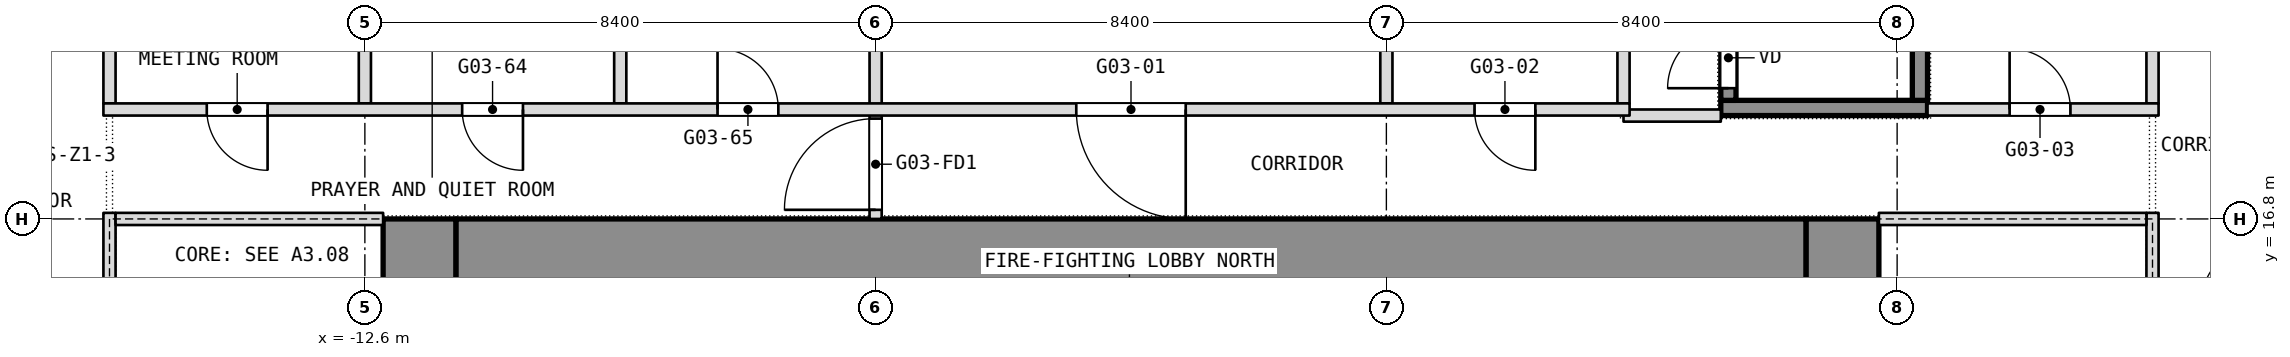
"""IFC4 building model, lengths in metres.
Left out: names, types, materials, properties, quantities, classifications, styles, units other than length and angle.
Written with IfcOpenShell. Run it as: python <this file> out.ifc"""

import sys

from ifc_helpers import new_model, si_unit, direction, frame, frame_2d, origin, place, context, subcontext, project, spatial, rectangle, extrude, element, fill, save


model = new_model("IFC4")
c1 = context("Model", 3, precision=1e-05, world=origin(), true_north=direction((0.0, 1.0)))
c2 = subcontext(c1, "Body", "Model", "MODEL_VIEW")
j1 = project(units=[si_unit("LENGTHUNIT", "METRE"), si_unit("PLANEANGLEUNIT", "RADIAN")], contexts=[c1])
p1 = place(None, origin())
s1 = spatial("IfcSite", under=j1, at=p1, CompositionType="ELEMENT")
p2 = place(p1, origin())
s2 = spatial("IfcBuilding", under=s1, at=p2, CompositionType="ELEMENT")
p3 = place(p2, frame((0.0, 0.0, 47.3)))
s3 = spatial("IfcBuildingStorey", under=s2, at=p3, CompositionType="ELEMENT", Elevation=47.3)
p4 = place(p3, frame((11.7, 0.0, 0.0), z_axis=(0.0, 0.0, 1.0), x_axis=(0.0, 1.0, 0.0)))
e1 = element("IfcWall", 1, at=p4, inside=s3, PredefinedType="SHEAR", context=c2, shape_type="SweptSolid", body=[
    extrude(rectangle(XDim=16.8, YDim=1.2, at=frame_2d((8.4, 0.0))), origin(), (0.0, 0.0, 1.0), 3.6),
])
p5 = place(p4, frame((1.837, 0.0, 0.0)))
e2 = element("IfcOpeningElement", 2, at=p5, cuts=e1, PredefinedType="OPENING", context=c2, shape_type="SweptSolid", body=[
    extrude(rectangle(XDim=0.9, YDim=2.1, at=frame_2d((0.45, 1.05))), frame((0.0, 0.6, 0.0), z_axis=(0.0, -1.0, 0.0), x_axis=(1.0, 0.0, 0.0)), (0.0, 0.0, 1.0), 1.2),
])
p6 = place(p4, frame((4.462, 0.0, 0.0)))
e3 = element("IfcOpeningElement", 3, at=p6, cuts=e1, PredefinedType="OPENING", context=c2, shape_type="SweptSolid", body=[
    extrude(rectangle(XDim=0.9, YDim=2.1, at=frame_2d((0.45, 1.05))), frame((0.0, 0.6, 0.0), z_axis=(0.0, -1.0, 0.0), x_axis=(1.0, 0.0, 0.0)), (0.0, 0.0, 1.0), 1.2),
])
p7 = place(p4, frame((6.825, 0.0, 0.0)))
e4 = element("IfcOpeningElement", 4, at=p7, cuts=e1, PredefinedType="OPENING", context=c2, shape_type="SweptSolid", body=[
    extrude(rectangle(XDim=1.2, YDim=2.1, at=frame_2d((0.6, 1.05))), frame((0.0, 0.6, 0.0), z_axis=(0.0, -1.0, 0.0), x_axis=(1.0, 0.0, 0.0)), (0.0, 0.0, 1.0), 1.2),
])
p8 = place(p4, frame((12.3, 0.0, 0.0)))
e5 = element("IfcOpeningElement", 5, at=p8, cuts=e1, PredefinedType="OPENING", context=c2, shape_type="SweptSolid", body=[
    extrude(rectangle(XDim=0.9, YDim=2.1, at=frame_2d((0.45, 1.05))), frame((0.0, 0.6, 0.0), z_axis=(0.0, -1.0, 0.0), x_axis=(1.0, 0.0, 0.0)), (0.0, 0.0, 1.0), 1.2),
])
p9 = place(p4, frame((8.775, 0.0, 0.0)))
e6 = element("IfcOpeningElement", 6, at=p9, cuts=e1, PredefinedType="OPENING", context=c2, shape_type="SweptSolid", body=[
    extrude(rectangle(XDim=1.2, YDim=2.1, at=frame_2d((0.6, 1.05))), frame((0.0, 0.6, 0.0), z_axis=(0.0, -1.0, 0.0), x_axis=(1.0, 0.0, 0.0)), (0.0, 0.0, 1.0), 1.2),
])
p10 = place(p3, frame((-11.7, 0.0, 0.0), z_axis=(0.0, 0.0, 1.0), x_axis=(0.0, 1.0, 0.0)))
e7 = element("IfcWall", 7, at=p10, inside=s3, PredefinedType="SHEAR", context=c2, shape_type="SweptSolid", body=[
    extrude(rectangle(XDim=16.8, YDim=1.2, at=frame_2d((8.4, 0.0))), origin(), (0.0, 0.0, 1.0), 3.6),
])
p11 = place(p10, frame((2.3, 0.0, 0.0)))
e8 = element("IfcOpeningElement", 8, at=p11, cuts=e7, PredefinedType="OPENING", context=c2, shape_type="SweptSolid", body=[
    extrude(rectangle(XDim=1.1, YDim=2.1, at=frame_2d((0.55, 1.05))), frame((0.0, 0.6, 0.0), z_axis=(0.0, -1.0, 0.0), x_axis=(1.0, 0.0, 0.0)), (0.0, 0.0, 1.0), 1.2),
])
p12 = place(p10, frame((4.85, 0.0, 0.0)))
e9 = element("IfcOpeningElement", 9, at=p12, cuts=e7, PredefinedType="OPENING", context=c2, shape_type="SweptSolid", body=[
    extrude(rectangle(XDim=1.1, YDim=2.1, at=frame_2d((0.55, 1.05))), frame((0.0, 0.6, 0.0), z_axis=(0.0, -1.0, 0.0), x_axis=(1.0, 0.0, 0.0)), (0.0, 0.0, 1.0), 1.2),
])
p13 = place(p10, frame((6.825, 0.0, 0.0)))
e10 = element("IfcOpeningElement", 10, at=p13, cuts=e7, PredefinedType="OPENING", context=c2, shape_type="SweptSolid", body=[
    extrude(rectangle(XDim=1.2, YDim=2.1, at=frame_2d((0.6, 1.05))), frame((0.0, 0.6, 0.0), z_axis=(0.0, -1.0, 0.0), x_axis=(1.0, 0.0, 0.0)), (0.0, 0.0, 1.0), 1.2),
])
p14 = place(p10, frame((13.4, 0.0, 0.0)))
e11 = element("IfcOpeningElement", 11, at=p14, cuts=e7, PredefinedType="OPENING", context=c2, shape_type="SweptSolid", body=[
    extrude(rectangle(XDim=1.1, YDim=2.1, at=frame_2d((0.55, 1.05))), frame((0.0, 0.6, 0.0), z_axis=(0.0, -1.0, 0.0), x_axis=(1.0, 0.0, 0.0)), (0.0, 0.0, 1.0), 1.2),
])
p15 = place(p10, frame((10.85, 0.0, 0.0)))
e12 = element("IfcOpeningElement", 12, at=p15, cuts=e7, PredefinedType="OPENING", context=c2, shape_type="SweptSolid", body=[
    extrude(rectangle(XDim=1.1, YDim=2.1, at=frame_2d((0.55, 1.05))), frame((0.0, 0.6, 0.0), z_axis=(0.0, -1.0, 0.0), x_axis=(1.0, 0.0, 0.0)), (0.0, 0.0, 1.0), 1.2),
])
p16 = place(p10, frame((8.775, 0.0, 0.0)))
e13 = element("IfcOpeningElement", 13, at=p16, cuts=e7, PredefinedType="OPENING", context=c2, shape_type="SweptSolid", body=[
    extrude(rectangle(XDim=1.2, YDim=2.1, at=frame_2d((0.6, 1.05))), frame((0.0, 0.6, 0.0), z_axis=(0.0, -1.0, 0.0), x_axis=(1.0, 0.0, 0.0)), (0.0, 0.0, 1.0), 1.2),
])
p17 = place(p3, frame((-11.1, 16.2, 0.0), z_axis=(0.0, 0.0, 1.0), x_axis=(1.0, 0.0, 0.0)))
e14 = element("IfcWall", 14, at=p17, inside=s3, PredefinedType="SHEAR", context=c2, shape_type="SweptSolid", body=[
    extrude(rectangle(XDim=22.2, YDim=1.2, at=frame_2d((11.1, 0.0))), origin(), (0.0, 0.0, 1.0), 3.6),
])
p18 = place(p3, frame((16.8, 18.7, 0.0), z_axis=(0.0, 0.0, 1.0), x_axis=(0.0, 1.0, 0.0)))
e15 = element("IfcWall", 15, at=p18, inside=s3, PredefinedType="PARTITIONING", context=c2, shape_type="SweptSolid", body=[
    extrude(rectangle(XDim=3.0, YDim=0.2, at=frame_2d((1.5, 0.0))), origin(), (0.0, 0.0, 1.0), 3.34),
])
for number, where, z_axis, x_axis in (
    (16, (8.1, 18.7, 0.0), (0.0, 0.0, 1.0), (0.0, 1.0, 0.0)),
    (17, (4.2, 18.7, 0.0), (0.0, 0.0, 1.0), (0.0, 1.0, 0.0)),
):
    element("IfcWall", number, at=place(p3, frame(where, z_axis=z_axis, x_axis=x_axis)), inside=s3, PredefinedType="PARTITIONING", context=c2, shape_type="SweptSolid", body=[
        extrude(rectangle(XDim=2.8, YDim=0.2, at=frame_2d((1.4, 0.0))), origin(), (0.0, 0.0, 1.0), 3.34),
    ])
p19 = place(p3, frame((-4.2, 16.8, 0.0), z_axis=(0.0, 0.0, 1.0), x_axis=(0.0, 1.0, 0.0)))
e18 = element("IfcWall", 18, at=p19, inside=s3, PredefinedType="PARTITIONING", context=c2, shape_type="SweptSolid", body=[
    extrude(rectangle(XDim=6.7, YDim=0.2, at=frame_2d((3.35, 0.0))), origin(), (0.0, 0.0, 1.0), 3.34),
])
p20 = place(p19, frame((0.15, 0.0, 0.0)))
e19 = element("IfcOpeningElement", 19, at=p20, cuts=e18, PredefinedType="OPENING", context=c2, shape_type="SweptSolid", body=[
    extrude(rectangle(XDim=1.5, YDim=2.1, at=frame_2d((0.75, 1.05))), frame((0.0, 0.1, 0.0), z_axis=(0.0, -1.0, 0.0), x_axis=(1.0, 0.0, 0.0)), (0.0, 0.0, 1.0), 0.2),
])
p21 = place(p19, frame((4.95, 0.0, 0.0)))
e20 = element("IfcOpeningElement", 20, at=p21, cuts=e18, PredefinedType="OPENING", context=c2, shape_type="SweptSolid", body=[
    extrude(rectangle(XDim=1.5, YDim=2.1, at=frame_2d((0.75, 1.05))), frame((0.0, 0.1, 0.0), z_axis=(0.0, -1.0, 0.0), x_axis=(1.0, 0.0, 0.0)), (0.0, 0.0, 1.0), 0.2),
])
for number, where, z_axis, x_axis in (
    (21, (-8.4, 18.7, 0.0), (0.0, 0.0, 1.0), (0.0, 1.0, 0.0)),
    (22, (-12.6, 18.7, 0.0), (0.0, 0.0, 1.0), (0.0, 1.0, 0.0)),
):
    element("IfcWall", number, at=place(p3, frame(where, z_axis=z_axis, x_axis=x_axis)), inside=s3, PredefinedType="PARTITIONING", context=c2, shape_type="SweptSolid", body=[
        extrude(rectangle(XDim=2.8, YDim=0.2, at=frame_2d((1.4, 0.0))), origin(), (0.0, 0.0, 1.0), 3.34),
    ])
p22 = place(p3, frame((-16.8, 18.7, 0.0), z_axis=(0.0, 0.0, 1.0), x_axis=(0.0, 1.0, 0.0)))
e23 = element("IfcWall", 23, at=p22, inside=s3, PredefinedType="PARTITIONING", context=c2, shape_type="SweptSolid", body=[
    extrude(rectangle(XDim=3.0, YDim=0.2, at=frame_2d((1.5, 0.0))), origin(), (0.0, 0.0, 1.0), 3.34),
])
p23 = place(p3, frame((8.1, 18.5, 0.0), z_axis=(0.0, 0.0, 1.0), x_axis=(1.0, 0.0, 0.0)))
e24 = element("IfcWall", 24, at=p23, inside=s3, PredefinedType="PARTITIONING", context=c2, shape_type="SweptSolid", body=[
    extrude(rectangle(XDim=1.6, YDim=0.2, at=frame_2d((0.8, 0.0))), origin(), (0.0, 0.0, 1.0), 3.34),
])
p24 = place(p3, frame((-16.9, 18.6, 0.0), z_axis=(0.0, 0.0, 1.0), x_axis=(1.0, 0.0, 0.0)))
e25 = element("IfcWall", 25, at=p24, inside=s3, PredefinedType="PARTITIONING", context=c2, shape_type="SweptSolid", body=[
    extrude(rectangle(XDim=25.1, YDim=0.2, at=frame_2d((12.55, 0.0))), origin(), (0.0, 0.0, 1.0), 3.34),
])
p25 = place(p24, frame((16.0, 0.0, 0.0)))
e26 = element("IfcOpeningElement", 26, at=p25, cuts=e25, PredefinedType="OPENING", context=c2, shape_type="SweptSolid", body=[
    extrude(rectangle(XDim=1.8, YDim=2.1, at=frame_2d((0.9, 1.05))), frame((0.0, 0.1, 0.0), z_axis=(0.0, -1.0, 0.0), x_axis=(1.0, 0.0, 0.0)), (0.0, 0.0, 1.0), 0.2),
])
p26 = place(p24, frame((22.55, 0.0, 0.0)))
e27 = element("IfcOpeningElement", 27, at=p26, cuts=e25, PredefinedType="OPENING", context=c2, shape_type="SweptSolid", body=[
    extrude(rectangle(XDim=1.0, YDim=2.1, at=frame_2d((0.5, 1.05))), frame((0.0, 0.1, 0.0), z_axis=(0.0, -1.0, 0.0), x_axis=(1.0, 0.0, 0.0)), (0.0, 0.0, 1.0), 0.2),
])
p27 = place(p24, frame((5.9, 0.0, 0.0)))
e28 = element("IfcOpeningElement", 28, at=p27, cuts=e25, PredefinedType="OPENING", context=c2, shape_type="SweptSolid", body=[
    extrude(rectangle(XDim=1.0, YDim=2.1, at=frame_2d((0.5, 1.05))), frame((0.0, 0.1, 0.0), z_axis=(0.0, -1.0, 0.0), x_axis=(1.0, 0.0, 0.0)), (0.0, 0.0, 1.0), 0.2),
])
p28 = place(p24, frame((10.1, 0.0, 0.0)))
e29 = element("IfcOpeningElement", 29, at=p28, cuts=e25, PredefinedType="OPENING", context=c2, shape_type="SweptSolid", body=[
    extrude(rectangle(XDim=1.0, YDim=2.1, at=frame_2d((0.5, 1.05))), frame((0.0, 0.1, 0.0), z_axis=(0.0, -1.0, 0.0), x_axis=(1.0, 0.0, 0.0)), (0.0, 0.0, 1.0), 0.2),
])
p29 = place(p24, frame((1.7, 0.0, 0.0)))
e30 = element("IfcOpeningElement", 30, at=p29, cuts=e25, PredefinedType="OPENING", context=c2, shape_type="SweptSolid", body=[
    extrude(rectangle(XDim=1.0, YDim=2.1, at=frame_2d((0.5, 1.05))), frame((0.0, 0.1, 0.0), z_axis=(0.0, -1.0, 0.0), x_axis=(1.0, 0.0, 0.0)), (0.0, 0.0, 1.0), 0.2),
])
p30 = place(p3, frame((13.1, 18.6, 0.0), z_axis=(0.0, 0.0, 1.0), x_axis=(1.0, 0.0, 0.0)))
e31 = element("IfcWall", 31, at=p30, inside=s3, PredefinedType="PARTITIONING", context=c2, shape_type="SweptSolid", body=[
    extrude(rectangle(XDim=3.8, YDim=0.2, at=frame_2d((1.9, 0.0))), origin(), (0.0, 0.0, 1.0), 3.34),
])
p31 = place(p30, frame((1.35, 0.0, 0.0)))
e32 = element("IfcOpeningElement", 32, at=p31, cuts=e31, PredefinedType="OPENING", context=c2, shape_type="SweptSolid", body=[
    extrude(rectangle(XDim=1.0, YDim=2.1, at=frame_2d((0.5, 1.05))), frame((0.0, 0.1, 0.0), z_axis=(0.0, -1.0, 0.0), x_axis=(1.0, 0.0, 0.0)), (0.0, 0.0, 1.0), 0.2),
])
p32 = place(p3, frame((-16.8, -0.1, 0.0), z_axis=(0.0, 0.0, 1.0), x_axis=(0.0, 1.0, 0.0)))
e33 = element("IfcWall", 33, at=p32, inside=s3, PredefinedType="PARTITIONING", context=c2, shape_type="SweptSolid", body=[
    extrude(rectangle(XDim=17.0, YDim=0.2, at=frame_2d((8.5, 0.0))), origin(), (0.0, 0.0, 1.0), 3.34),
])
p33 = place(p32, frame((2.2, 0.0, 0.0)))
e34 = element("IfcOpeningElement", 34, at=p33, cuts=e33, PredefinedType="OPENING", context=c2, shape_type="SweptSolid", body=[
    extrude(rectangle(XDim=1.8, YDim=2.1, at=frame_2d((0.9, 1.05))), frame((0.0, 0.1, 0.0), z_axis=(0.0, -1.0, 0.0), x_axis=(1.0, 0.0, 0.0)), (0.0, 0.0, 1.0), 0.2),
])
p34 = place(p32, frame((7.2, 0.0, 0.0)))
e35 = element("IfcOpeningElement", 35, at=p34, cuts=e33, PredefinedType="OPENING", context=c2, shape_type="SweptSolid", body=[
    extrude(rectangle(XDim=1.8, YDim=2.1, at=frame_2d((0.9, 1.05))), frame((0.0, 0.1, 0.0), z_axis=(0.0, -1.0, 0.0), x_axis=(1.0, 0.0, 0.0)), (0.0, 0.0, 1.0), 0.2),
])
p35 = place(p3, frame((-16.7, 16.8, 0.0), z_axis=(0.0, 0.0, 1.0), x_axis=(1.0, 0.0, 0.0)))
e36 = element("IfcWall", 36, at=p35, inside=s3, PredefinedType="PARTITIONING", context=c2, shape_type="SweptSolid", body=[
    extrude(rectangle(XDim=4.4, YDim=0.2, at=frame_2d((2.2, 0.0))), origin(), (0.0, 0.0, 1.0), 2.84),
])
p36 = place(p3, frame((16.8, -0.1, 0.0), z_axis=(0.0, 0.0, 1.0), x_axis=(0.0, 1.0, 0.0)))
e37 = element("IfcWall", 37, at=p36, inside=s3, PredefinedType="PARTITIONING", context=c2, shape_type="SweptSolid", body=[
    extrude(rectangle(XDim=17.0, YDim=0.2, at=frame_2d((8.5, 0.0))), origin(), (0.0, 0.0, 1.0), 3.34),
])
p37 = place(p36, frame((2.2, 0.0, 0.0)))
e38 = element("IfcOpeningElement", 38, at=p37, cuts=e37, PredefinedType="OPENING", context=c2, shape_type="SweptSolid", body=[
    extrude(rectangle(XDim=1.8, YDim=2.1, at=frame_2d((0.9, 1.05))), frame((0.0, 0.1, 0.0), z_axis=(0.0, -1.0, 0.0), x_axis=(1.0, 0.0, 0.0)), (0.0, 0.0, 1.0), 0.2),
])
p38 = place(p36, frame((13.0, 0.0, 0.0)))
e39 = element("IfcOpeningElement", 39, at=p38, cuts=e37, PredefinedType="OPENING", context=c2, shape_type="SweptSolid", body=[
    extrude(rectangle(XDim=1.8, YDim=2.1, at=frame_2d((0.9, 1.05))), frame((0.0, 0.1, 0.0), z_axis=(0.0, -1.0, 0.0), x_axis=(1.0, 0.0, 0.0)), (0.0, 0.0, 1.0), 0.2),
])
p39 = place(p3, frame((12.3, 16.8, 0.0), z_axis=(0.0, 0.0, 1.0), x_axis=(1.0, 0.0, 0.0)))
e40 = element("IfcWall", 40, at=p39, inside=s3, PredefinedType="PARTITIONING", context=c2, shape_type="SweptSolid", body=[
    extrude(rectangle(XDim=4.4, YDim=0.2, at=frame_2d((2.2, 0.0))), origin(), (0.0, 0.0, 1.0), 2.84),
])
p40 = place(p3, frame((9.7, 18.625, 0.1), z_axis=(0.0, 0.0, 1.0), x_axis=(1.0, 0.0, 0.0)))
e41 = element("IfcWall", 41, at=p40, inside=s3, PredefinedType="SHEAR", context=c2, shape_type="SweptSolid", body=[
    extrude(rectangle(XDim=3.4, YDim=0.25, at=frame_2d((1.7, 0.0))), origin(), (0.0, 0.0, 1.0), 3.6),
])
p41 = place(p3, frame((9.825, 18.75, 0.1), z_axis=(0.0, 0.0, 1.0), x_axis=(0.0, 1.0, 0.0)))
e42 = element("IfcWall", 42, at=p41, inside=s3, PredefinedType="SHEAR", context=c2, shape_type="SweptSolid", body=[
    extrude(rectangle(XDim=5.7, YDim=0.25, at=frame_2d((2.85, 0.0))), origin(), (0.0, 0.0, 1.0), 3.6),
])
p42 = place(p41, frame((0.2, 0.0, 0.0)))
e43 = element("IfcOpeningElement", 43, at=p42, cuts=e42, PredefinedType="OPENING", context=c2, shape_type="SweptSolid", body=[
    extrude(rectangle(XDim=1.0, YDim=2.1, at=frame_2d((0.5, 1.05))), frame((0.0, 0.125, 0.0), z_axis=(0.0, -1.0, 0.0), x_axis=(1.0, 0.0, 0.0)), (0.0, 0.0, 1.0), 0.25),
])
p43 = place(p3, frame((12.975, 18.75, 0.1), z_axis=(0.0, 0.0, 1.0), x_axis=(0.0, 1.0, 0.0)))
e44 = element("IfcWall", 44, at=p43, inside=s3, PredefinedType="SHEAR", context=c2, shape_type="SweptSolid", body=[
    extrude(rectangle(XDim=5.7, YDim=0.25, at=frame_2d((2.85, 0.0))), origin(), (0.0, 0.0, 1.0), 3.6),
])
p44 = place(p25, origin())
e45 = element("IfcDoor", 45, at=p44, inside=s3, OperationType="DOUBLE_DOOR_SINGLE_SWING", PredefinedType="DOOR", context=c2, shape_type="SweptSolid", body=[
    extrude(rectangle(XDim=1.8, YDim=2.1, at=frame_2d((0.9, 1.05))), frame((0.0, 0.025, 0.0), z_axis=(0.0, -1.0, 0.0), x_axis=(1.0, 0.0, 0.0)), (0.0, 0.0, 1.0), 0.05),
])
fill(e26, e45)
p45 = place(p26, origin())
e46 = element("IfcDoor", 46, at=p45, inside=s3, OperationType="SINGLE_SWING_RIGHT", PredefinedType="DOOR", context=c2, shape_type="SweptSolid", body=[
    extrude(rectangle(XDim=1.0, YDim=2.1, at=frame_2d((0.5, 1.05))), frame((0.0, 0.025, 0.0), z_axis=(0.0, -1.0, 0.0), x_axis=(1.0, 0.0, 0.0)), (0.0, 0.0, 1.0), 0.05),
])
fill(e27, e46)
p46 = place(p27, origin())
e47 = element("IfcDoor", 47, at=p46, inside=s3, OperationType="SINGLE_SWING_RIGHT", PredefinedType="DOOR", context=c2, shape_type="SweptSolid", body=[
    extrude(rectangle(XDim=1.0, YDim=2.1, at=frame_2d((0.5, 1.05))), frame((0.0, 0.025, 0.0), z_axis=(0.0, -1.0, 0.0), x_axis=(1.0, 0.0, 0.0)), (0.0, 0.0, 1.0), 0.05),
])
fill(e28, e47)
p47 = place(p28, origin())
e48 = element("IfcDoor", 48, at=p47, inside=s3, OperationType="SINGLE_SWING_LEFT", PredefinedType="DOOR", context=c2, shape_type="SweptSolid", body=[
    extrude(rectangle(XDim=1.0, YDim=2.1, at=frame_2d((0.5, 1.05))), frame((0.0, 0.025, 0.0), z_axis=(0.0, -1.0, 0.0), x_axis=(1.0, 0.0, 0.0)), (0.0, 0.0, 1.0), 0.05),
])
fill(e29, e48)
p48 = place(p29, origin())
e49 = element("IfcDoor", 49, at=p48, inside=s3, OperationType="SINGLE_SWING_RIGHT", PredefinedType="DOOR", context=c2, shape_type="SweptSolid", body=[
    extrude(rectangle(XDim=1.0, YDim=2.1, at=frame_2d((0.5, 1.05))), frame((0.0, 0.025, 0.0), z_axis=(0.0, -1.0, 0.0), x_axis=(1.0, 0.0, 0.0)), (0.0, 0.0, 1.0), 0.05),
])
fill(e30, e49)
p49 = place(p31, origin())
e50 = element("IfcDoor", 50, at=p49, inside=s3, OperationType="SINGLE_SWING_LEFT", PredefinedType="DOOR", context=c2, shape_type="SweptSolid", body=[
    extrude(rectangle(XDim=1.0, YDim=2.1, at=frame_2d((0.5, 1.05))), frame((0.0, 0.025, 0.0), z_axis=(0.0, -1.0, 0.0), x_axis=(1.0, 0.0, 0.0)), (0.0, 0.0, 1.0), 0.05),
])
fill(e32, e50)
p50 = place(p42, origin())
e51 = element("IfcDoor", 51, at=p50, inside=s3, OperationType="SINGLE_SWING_LEFT", PredefinedType="DOOR", context=c2, shape_type="SweptSolid", body=[
    extrude(rectangle(XDim=1.0, YDim=2.1, at=frame_2d((0.5, 1.05))), frame((0.0, 0.025, 0.0), z_axis=(0.0, -1.0, 0.0), x_axis=(1.0, 0.0, 0.0)), (0.0, 0.0, 1.0), 0.05),
])
fill(e43, e51)
p51 = place(p20, origin())
e52 = element("IfcDoor", 52, at=p51, inside=s3, OperationType="DOUBLE_DOOR_DOUBLE_SWING", PredefinedType="DOOR", context=c2, shape_type="SweptSolid", body=[
    extrude(rectangle(XDim=1.5, YDim=2.1, at=frame_2d((0.75, 1.05))), frame((0.0, 0.025, 0.0), z_axis=(0.0, -1.0, 0.0), x_axis=(1.0, 0.0, 0.0)), (0.0, 0.0, 1.0), 0.05),
])
fill(e19, e52)
save(model, sys.argv[1])
